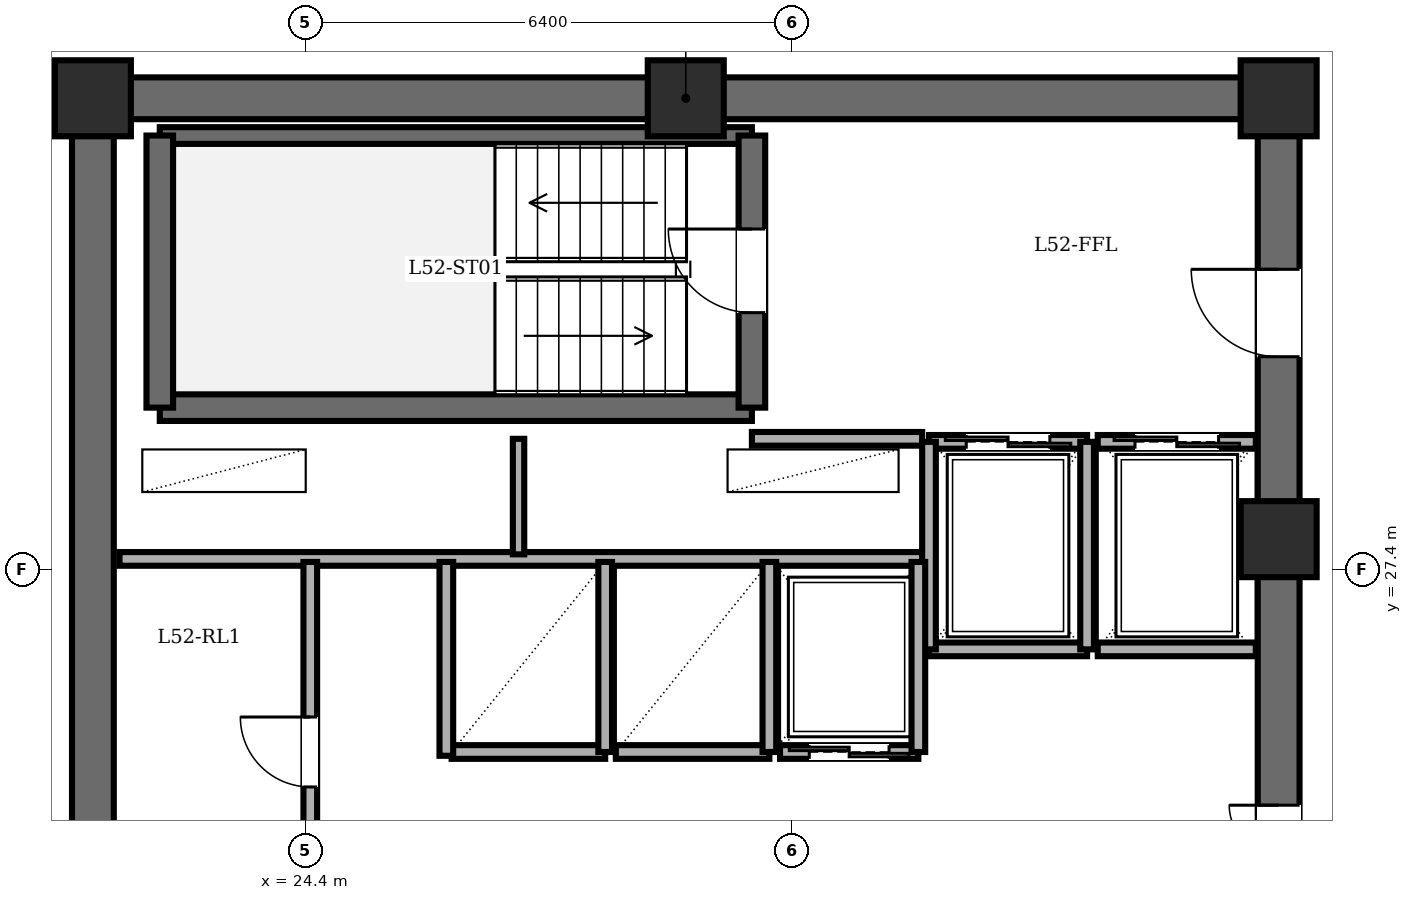
"""IFC4 building model, lengths in metres.
Left out: names, types, materials, properties, quantities, classifications, styles, units other than length and angle.
Written with IfcOpenShell. Run it as: python <this file> out.ifc"""

import sys

from ifc_helpers import new_model, si_unit, direction, frame, frame_2d, origin, origin_2d, place, context, subcontext, project, spatial, rectangle, extrude, element, fill, save


model = new_model("IFC4")
c1 = context("Model", 3, precision=1e-05, world=origin(), true_north=direction((0.0, 1.0)))
c2 = subcontext(c1, "Body", "Model", "MODEL_VIEW")
j1 = project(units=[si_unit("LENGTHUNIT", "METRE"), si_unit("PLANEANGLEUNIT", "RADIAN")], contexts=[c1])
p1 = place(None, origin())
s1 = spatial("IfcSite", under=j1, at=p1, CompositionType="ELEMENT")
p2 = place(p1, origin())
s2 = spatial("IfcBuilding", under=s1, at=p2, CompositionType="ELEMENT")
p3 = place(p2, frame((0.0, 0.0, 201.3)))
s3 = spatial("IfcBuildingStorey", under=s2, at=p3, CompositionType="ELEMENT", Elevation=201.3)
for number, where, z_axis, x_axis in (
    (1, (37.2, 27.8, 0.0), (0.0, 0.0, 1.0), (1.0, 0.0, 0.0)),
    (2, (37.2, 33.6, 0.0), (0.0, 0.0, 1.0), (1.0, 0.0, 0.0)),
    (3, (29.4, 33.6, 0.0), (0.0, 0.0, 1.0), (1.0, 0.0, 0.0)),
    (4, (21.6, 33.6, 0.0), (0.0, 0.0, 1.0), (1.0, 0.0, 0.0)),
):
    element("IfcColumn", number, at=place(p3, frame(where, z_axis=z_axis, x_axis=x_axis)), inside=s3, PredefinedType="COLUMN", context=c2, shape_type="SweptSolid", body=[
        extrude(rectangle(XDim=1.0, YDim=1.0, at=origin_2d()), origin(), (0.0, 0.0, 1.0), 3.6),
    ])
p4 = place(p3, frame((21.6, 14.4, 0.0), z_axis=(0.0, 0.0, 1.0), x_axis=(0.0, 1.0, 0.0)))
e5 = element("IfcWall", 5, at=p4, inside=s3, PredefinedType="SHEAR", context=c2, shape_type="SweptSolid", body=[
    extrude(rectangle(XDim=19.2, YDim=0.55, at=frame_2d((9.6, 0.0))), origin(), (0.0, 0.0, 1.0), 3.4),
])
p5 = place(p3, frame((21.6, 33.6, 0.0), z_axis=(0.0, 0.0, 1.0), x_axis=(1.0, 0.0, 0.0)))
e6 = element("IfcWall", 6, at=p5, inside=s3, PredefinedType="SHEAR", context=c2, shape_type="SweptSolid", body=[
    extrude(rectangle(XDim=15.6, YDim=0.55, at=frame_2d((7.8, 0.0))), origin(), (0.0, 0.0, 1.0), 3.4),
])
p6 = place(p3, frame((37.2, 14.4, 0.0), z_axis=(0.0, 0.0, 1.0), x_axis=(0.0, 1.0, 0.0)))
e7 = element("IfcWall", 7, at=p6, inside=s3, PredefinedType="SHEAR", context=c2, shape_type="SweptSolid", body=[
    extrude(rectangle(XDim=19.2, YDim=0.55, at=frame_2d((9.6, 0.0))), origin(), (0.0, 0.0, 1.0), 3.4),
])
p7 = place(p6, frame((15.8, 0.0, 0.0)))
e8 = element("IfcOpeningElement", 8, at=p7, cuts=e7, PredefinedType="OPENING", context=c2, shape_type="SweptSolid", body=[
    extrude(rectangle(XDim=1.15, YDim=2.15, at=frame_2d((0.575, 1.075))), frame((0.0, 0.285, 0.0), z_axis=(0.0, -1.0, 0.0), x_axis=(1.0, 0.0, 0.0)), (0.0, 0.0, 1.0), 0.57),
])
p8 = place(p6, frame((3.6, 0.0, 0.0)))
e9 = element("IfcOpeningElement", 9, at=p8, cuts=e7, PredefinedType="OPENING", context=c2, shape_type="SweptSolid", body=[
    extrude(rectangle(XDim=1.1, YDim=2.15, at=frame_2d((0.55, 1.075))), frame((0.0, 0.285, 0.0), z_axis=(0.0, -1.0, 0.0), x_axis=(1.0, 0.0, 0.0)), (0.0, 0.0, 1.0), 0.57),
])
p9 = place(p6, frame((8.6, 0.0, 0.0)))
e10 = element("IfcOpeningElement", 10, at=p9, cuts=e7, PredefinedType="OPENING", context=c2, shape_type="SweptSolid", body=[
    extrude(rectangle(XDim=1.3, YDim=2.2, at=frame_2d((0.65, 1.1))), frame((0.0, 0.285, 0.0), z_axis=(0.0, -1.0, 0.0), x_axis=(1.0, 0.0, 0.0)), (0.0, 0.0, 1.0), 0.57),
])
p10 = place(p3, frame((22.48, 29.53, 0.0), z_axis=(0.0, 0.0, 1.0), x_axis=(1.0, 0.0, 0.0)))
e11 = element("IfcWall", 11, at=p10, inside=s3, PredefinedType="SOLIDWALL", context=c2, shape_type="SweptSolid", body=[
    extrude(rectangle(XDim=7.79, YDim=0.35, at=frame_2d((3.895, 0.0))), origin(), (0.0, 0.0, 1.0), 3.4),
])
p11 = place(p3, frame((22.48, 33.11, 0.0), z_axis=(0.0, 0.0, 1.0), x_axis=(1.0, 0.0, 0.0)))
e12 = element("IfcWall", 12, at=p11, inside=s3, PredefinedType="PARTITIONING", context=c2, shape_type="SweptSolid", body=[
    extrude(rectangle(XDim=7.79, YDim=0.22, at=frame_2d((3.895, 0.0))), origin(), (0.0, 0.0, 1.0), 3.4),
])
p12 = place(p3, frame((22.48, 29.53, 0.0), z_axis=(0.0, 0.0, 1.0), x_axis=(0.0, 1.0, 0.0)))
e13 = element("IfcWall", 13, at=p12, inside=s3, PredefinedType="SOLIDWALL", context=c2, shape_type="SweptSolid", body=[
    extrude(rectangle(XDim=3.58, YDim=0.35, at=frame_2d((1.79, 0.0))), origin(), (0.0, 0.0, 1.0), 3.4),
])
p13 = place(p3, frame((30.27, 29.53, 0.0), z_axis=(0.0, 0.0, 1.0), x_axis=(0.0, 1.0, 0.0)))
e14 = element("IfcWall", 14, at=p13, inside=s3, PredefinedType="SOLIDWALL", context=c2, shape_type="SweptSolid", body=[
    extrude(rectangle(XDim=3.58, YDim=0.35, at=frame_2d((1.79, 0.0))), origin(), (0.0, 0.0, 1.0), 3.4),
])
p14 = place(p13, frame((1.25, 0.0, 0.0)))
e15 = element("IfcOpeningElement", 15, at=p14, cuts=e14, PredefinedType="OPENING", context=c2, shape_type="SweptSolid", body=[
    extrude(rectangle(XDim=1.1, YDim=2.15, at=frame_2d((0.55, 1.075))), frame((0.0, 0.185, 0.0), z_axis=(0.0, -1.0, 0.0), x_axis=(1.0, 0.0, 0.0)), (0.0, 0.0, 1.0), 0.37),
])
p15 = place(p3, frame((30.27, 29.12, 0.0), z_axis=(0.0, 0.0, 1.0), x_axis=(1.0, 0.0, 0.0)))
e16 = element("IfcWall", 16, at=p15, inside=s3, PredefinedType="PARTITIONING", context=c2, shape_type="SweptSolid", body=[
    extrude(rectangle(XDim=2.24, YDim=0.18, at=frame_2d((1.12, 0.0))), origin(), (0.0, 0.0, 1.0), 3.4),
])
p16 = place(p3, frame((21.95, 27.54, 0.0), z_axis=(0.0, 0.0, 1.0), x_axis=(1.0, 0.0, 0.0)))
e17 = element("IfcWall", 17, at=p16, inside=s3, PredefinedType="PARTITIONING", context=c2, shape_type="SweptSolid", body=[
    extrude(rectangle(XDim=10.56, YDim=0.18, at=frame_2d((5.28, 0.0))), origin(), (0.0, 0.0, 1.0), 3.4),
])
p17 = place(p3, frame((27.2, 27.6, 0.0), z_axis=(0.0, 0.0, 1.0), x_axis=(0.0, 1.0, 0.0)))
e18 = element("IfcWall", 18, at=p17, inside=s3, PredefinedType="PARTITIONING", context=c2, shape_type="SweptSolid", body=[
    extrude(rectangle(XDim=1.52, YDim=0.15, at=frame_2d((0.76, 0.0))), origin(), (0.0, 0.0, 1.0), 3.4),
])
p18 = place(p3, frame((32.6, 29.08, 0.0), z_axis=(0.0, 0.0, 1.0), x_axis=(1.0, 0.0, 0.0)))
e19 = element("IfcWall", 19, at=p18, inside=s3, PredefinedType="PARTITIONING", context=c2, shape_type="SweptSolid", body=[
    extrude(rectangle(XDim=2.08, YDim=0.18, at=frame_2d((1.04, 0.0))), origin(), (0.0, 0.0, 1.0), 3.4),
])
p19 = place(p18, frame((0.49, 0.0, 0.0)))
e20 = element("IfcOpeningElement", 20, at=p19, cuts=e19, PredefinedType="OPENING", context=c2, shape_type="SweptSolid", body=[
    extrude(rectangle(XDim=1.1, YDim=2.2, at=frame_2d((0.55, 1.1))), frame((0.0, 0.1, 0.0), z_axis=(0.0, -1.0, 0.0), x_axis=(1.0, 0.0, 0.0)), (0.0, 0.0, 1.0), 0.2),
])
p20 = place(p3, frame((34.68, 26.35, 0.0), z_axis=(0.0, 0.0, 1.0), x_axis=(-1.0, 0.0, 0.0)))
e21 = element("IfcWall", 21, at=p20, inside=s3, PredefinedType="PARTITIONING", context=c2, shape_type="SweptSolid", body=[
    extrude(rectangle(XDim=2.08, YDim=0.18, at=frame_2d((1.04, 0.0))), origin(), (0.0, 0.0, 1.0), 3.4),
])
for number, where, z_axis, x_axis in (
    (22, (34.68, 26.35, 0.0), (0.0, 0.0, 1.0), (0.0, 1.0, 0.0)),
    (23, (32.6, 29.08, 0.0), (0.0, 0.0, 1.0), (0.0, -1.0, 0.0)),
):
    element("IfcWall", number, at=place(p3, frame(where, z_axis=z_axis, x_axis=x_axis)), inside=s3, PredefinedType="PARTITIONING", context=c2, shape_type="SweptSolid", body=[
        extrude(rectangle(XDim=2.73, YDim=0.18, at=frame_2d((1.365, 0.0))), origin(), (0.0, 0.0, 1.0), 3.4),
    ])
p21 = place(p3, frame((34.82, 29.08, 0.0), z_axis=(0.0, 0.0, 1.0), x_axis=(1.0, 0.0, 0.0)))
e24 = element("IfcWall", 24, at=p21, inside=s3, PredefinedType="PARTITIONING", context=c2, shape_type="SweptSolid", body=[
    extrude(rectangle(XDim=2.08, YDim=0.18, at=frame_2d((1.04, 0.0))), origin(), (0.0, 0.0, 1.0), 3.4),
])
p22 = place(p21, frame((0.49, 0.0, 0.0)))
e25 = element("IfcOpeningElement", 25, at=p22, cuts=e24, PredefinedType="OPENING", context=c2, shape_type="SweptSolid", body=[
    extrude(rectangle(XDim=1.1, YDim=2.2, at=frame_2d((0.55, 1.1))), frame((0.0, 0.1, 0.0), z_axis=(0.0, -1.0, 0.0), x_axis=(1.0, 0.0, 0.0)), (0.0, 0.0, 1.0), 0.2),
])
p23 = place(p3, frame((36.9, 26.35, 0.0), z_axis=(0.0, 0.0, 1.0), x_axis=(-1.0, 0.0, 0.0)))
e26 = element("IfcWall", 26, at=p23, inside=s3, PredefinedType="PARTITIONING", context=c2, shape_type="SweptSolid", body=[
    extrude(rectangle(XDim=2.08, YDim=0.18, at=frame_2d((1.04, 0.0))), origin(), (0.0, 0.0, 1.0), 3.4),
])
p24 = place(p3, frame((28.34, 25.0, 0.0), z_axis=(0.0, 0.0, 1.0), x_axis=(-1.0, 0.0, 0.0)))
e27 = element("IfcWall", 27, at=p24, inside=s3, PredefinedType="PARTITIONING", context=c2, shape_type="SweptSolid", body=[
    extrude(rectangle(XDim=2.02, YDim=0.18, at=frame_2d((1.01, 0.0))), origin(), (0.0, 0.0, 1.0), 3.4),
])
p25 = place(p3, frame((28.34, 25.0, 0.0), z_axis=(0.0, 0.0, 1.0), x_axis=(0.0, 1.0, 0.0)))
e28 = element("IfcWall", 28, at=p25, inside=s3, PredefinedType="PARTITIONING", context=c2, shape_type="SweptSolid", body=[
    extrude(rectangle(XDim=2.5, YDim=0.18, at=frame_2d((1.25, 0.0))), origin(), (0.0, 0.0, 1.0), 3.4),
])
p26 = place(p3, frame((30.5, 25.0, 0.0), z_axis=(0.0, 0.0, 1.0), x_axis=(-1.0, 0.0, 0.0)))
e29 = element("IfcWall", 29, at=p26, inside=s3, PredefinedType="PARTITIONING", context=c2, shape_type="SweptSolid", body=[
    extrude(rectangle(XDim=2.02, YDim=0.18, at=frame_2d((1.01, 0.0))), origin(), (0.0, 0.0, 1.0), 3.4),
])
p27 = place(p3, frame((30.5, 25.0, 0.0), z_axis=(0.0, 0.0, 1.0), x_axis=(0.0, 1.0, 0.0)))
e30 = element("IfcWall", 30, at=p27, inside=s3, PredefinedType="PARTITIONING", context=c2, shape_type="SweptSolid", body=[
    extrude(rectangle(XDim=2.5, YDim=0.18, at=frame_2d((1.25, 0.0))), origin(), (0.0, 0.0, 1.0), 3.4),
])
p28 = place(p3, frame((32.46, 25.0, 0.0), z_axis=(0.0, 0.0, 1.0), x_axis=(-1.0, 0.0, 0.0)))
e31 = element("IfcWall", 31, at=p28, inside=s3, PredefinedType="PARTITIONING", context=c2, shape_type="SweptSolid", body=[
    extrude(rectangle(XDim=1.82, YDim=0.18, at=frame_2d((0.91, 0.0))), origin(), (0.0, 0.0, 1.0), 3.4),
])
p29 = place(p28, frame((0.385, 0.0, 0.0)))
e32 = element("IfcOpeningElement", 32, at=p29, cuts=e31, PredefinedType="OPENING", context=c2, shape_type="SweptSolid", body=[
    extrude(rectangle(XDim=1.05, YDim=2.2, at=frame_2d((0.525, 1.1))), frame((0.0, 0.1, 0.0), z_axis=(0.0, -1.0, 0.0), x_axis=(1.0, 0.0, 0.0)), (0.0, 0.0, 1.0), 0.2),
])
p30 = place(p3, frame((32.46, 25.0, 0.0), z_axis=(0.0, 0.0, 1.0), x_axis=(0.0, 1.0, 0.0)))
e33 = element("IfcWall", 33, at=p30, inside=s3, PredefinedType="PARTITIONING", context=c2, shape_type="SweptSolid", body=[
    extrude(rectangle(XDim=2.5, YDim=0.18, at=frame_2d((1.25, 0.0))), origin(), (0.0, 0.0, 1.0), 3.4),
])
p31 = place(p3, frame((24.46, 22.5, 0.0), z_axis=(0.0, 0.0, 1.0), x_axis=(0.0, 1.0, 0.0)))
e34 = element("IfcWall", 34, at=p31, inside=s3, PredefinedType="PARTITIONING", context=c2, shape_type="SweptSolid", body=[
    extrude(rectangle(XDim=5.0, YDim=0.18, at=frame_2d((2.5, 0.0))), origin(), (0.0, 0.0, 1.0), 3.4),
])
p32 = place(p31, frame((2.04, 0.0, 0.0)))
e35 = element("IfcOpeningElement", 35, at=p32, cuts=e34, PredefinedType="OPENING", context=c2, shape_type="SweptSolid", body=[
    extrude(rectangle(XDim=0.92, YDim=2.1, at=frame_2d((0.46, 1.05))), frame((0.0, 0.1, 0.0), z_axis=(0.0, -1.0, 0.0), x_axis=(1.0, 0.0, 0.0)), (0.0, 0.0, 1.0), 0.2),
])
p33 = place(p3, frame((26.25, 24.95, 0.0), z_axis=(0.0, 0.0, 1.0), x_axis=(0.0, 1.0, 0.0)))
e36 = element("IfcWall", 36, at=p33, inside=s3, PredefinedType="PARTITIONING", context=c2, shape_type="SweptSolid", body=[
    extrude(rectangle(XDim=2.55, YDim=0.18, at=frame_2d((1.275, 0.0))), origin(), (0.0, 0.0, 1.0), 3.4),
])
p34 = place(p14, origin())
e37 = element("IfcDoor", 37, at=p34, inside=s3, OperationType="SINGLE_SWING_RIGHT", PredefinedType="DOOR", context=c2, shape_type="SweptSolid", body=[
    extrude(rectangle(XDim=1.1, YDim=2.15, at=frame_2d((0.55, 1.075))), frame((0.0, 0.025, 0.0), z_axis=(0.0, -1.0, 0.0), x_axis=(1.0, 0.0, 0.0)), (0.0, 0.0, 1.0), 0.05),
])
fill(e15, e37)
p35 = place(p7, origin())
e38 = element("IfcDoor", 38, at=p35, inside=s3, OperationType="SINGLE_SWING_RIGHT", PredefinedType="DOOR", context=c2, shape_type="SweptSolid", body=[
    extrude(rectangle(XDim=1.15, YDim=2.15, at=frame_2d((0.575, 1.075))), frame((0.0, 0.025, 0.0), z_axis=(0.0, -1.0, 0.0), x_axis=(1.0, 0.0, 0.0)), (0.0, 0.0, 1.0), 0.05),
])
fill(e8, e38)
p36 = place(p19, origin())
e39 = element("IfcDoor", 39, at=p36, inside=s3, OperationType="DOUBLE_DOOR_SLIDING", PredefinedType="DOOR", context=c2, shape_type="SweptSolid", body=[
    extrude(rectangle(XDim=1.1, YDim=2.2, at=frame_2d((0.55, 1.1))), frame((0.0, 0.025, 0.0), z_axis=(0.0, -1.0, 0.0), x_axis=(1.0, 0.0, 0.0)), (0.0, 0.0, 1.0), 0.05),
])
fill(e20, e39)
p37 = place(p22, origin())
e40 = element("IfcDoor", 40, at=p37, inside=s3, OperationType="DOUBLE_DOOR_SLIDING", PredefinedType="DOOR", context=c2, shape_type="SweptSolid", body=[
    extrude(rectangle(XDim=1.1, YDim=2.2, at=frame_2d((0.55, 1.1))), frame((0.0, 0.025, 0.0), z_axis=(0.0, -1.0, 0.0), x_axis=(1.0, 0.0, 0.0)), (0.0, 0.0, 1.0), 0.05),
])
fill(e25, e40)
p38 = place(p29, origin())
e41 = element("IfcDoor", 41, at=p38, inside=s3, OperationType="DOUBLE_DOOR_SLIDING", PredefinedType="DOOR", context=c2, shape_type="SweptSolid", body=[
    extrude(rectangle(XDim=1.05, YDim=2.2, at=frame_2d((0.525, 1.1))), frame((0.0, 0.025, 0.0), z_axis=(0.0, -1.0, 0.0), x_axis=(1.0, 0.0, 0.0)), (0.0, 0.0, 1.0), 0.05),
])
fill(e32, e41)
p39 = place(p32, origin())
e42 = element("IfcDoor", 42, at=p39, inside=s3, OperationType="SINGLE_SWING_RIGHT", PredefinedType="DOOR", context=c2, shape_type="SweptSolid", body=[
    extrude(rectangle(XDim=0.92, YDim=2.1, at=frame_2d((0.46, 1.05))), frame((0.0, 0.025, 0.0), z_axis=(0.0, -1.0, 0.0), x_axis=(1.0, 0.0, 0.0)), (0.0, 0.0, 1.0), 0.05),
])
fill(e35, e42)
p40 = place(p9, origin())
e43 = element("IfcDoor", 43, at=p40, inside=s3, OperationType="DOUBLE_DOOR_SINGLE_SWING", PredefinedType="DOOR", context=c2, shape_type="SweptSolid", body=[
    extrude(rectangle(XDim=1.3, YDim=2.2, at=frame_2d((0.65, 1.1))), frame((0.0, 0.025, 0.0), z_axis=(0.0, -1.0, 0.0), x_axis=(1.0, 0.0, 0.0)), (0.0, 0.0, 1.0), 0.05),
])
fill(e10, e43)
save(model, sys.argv[1])
